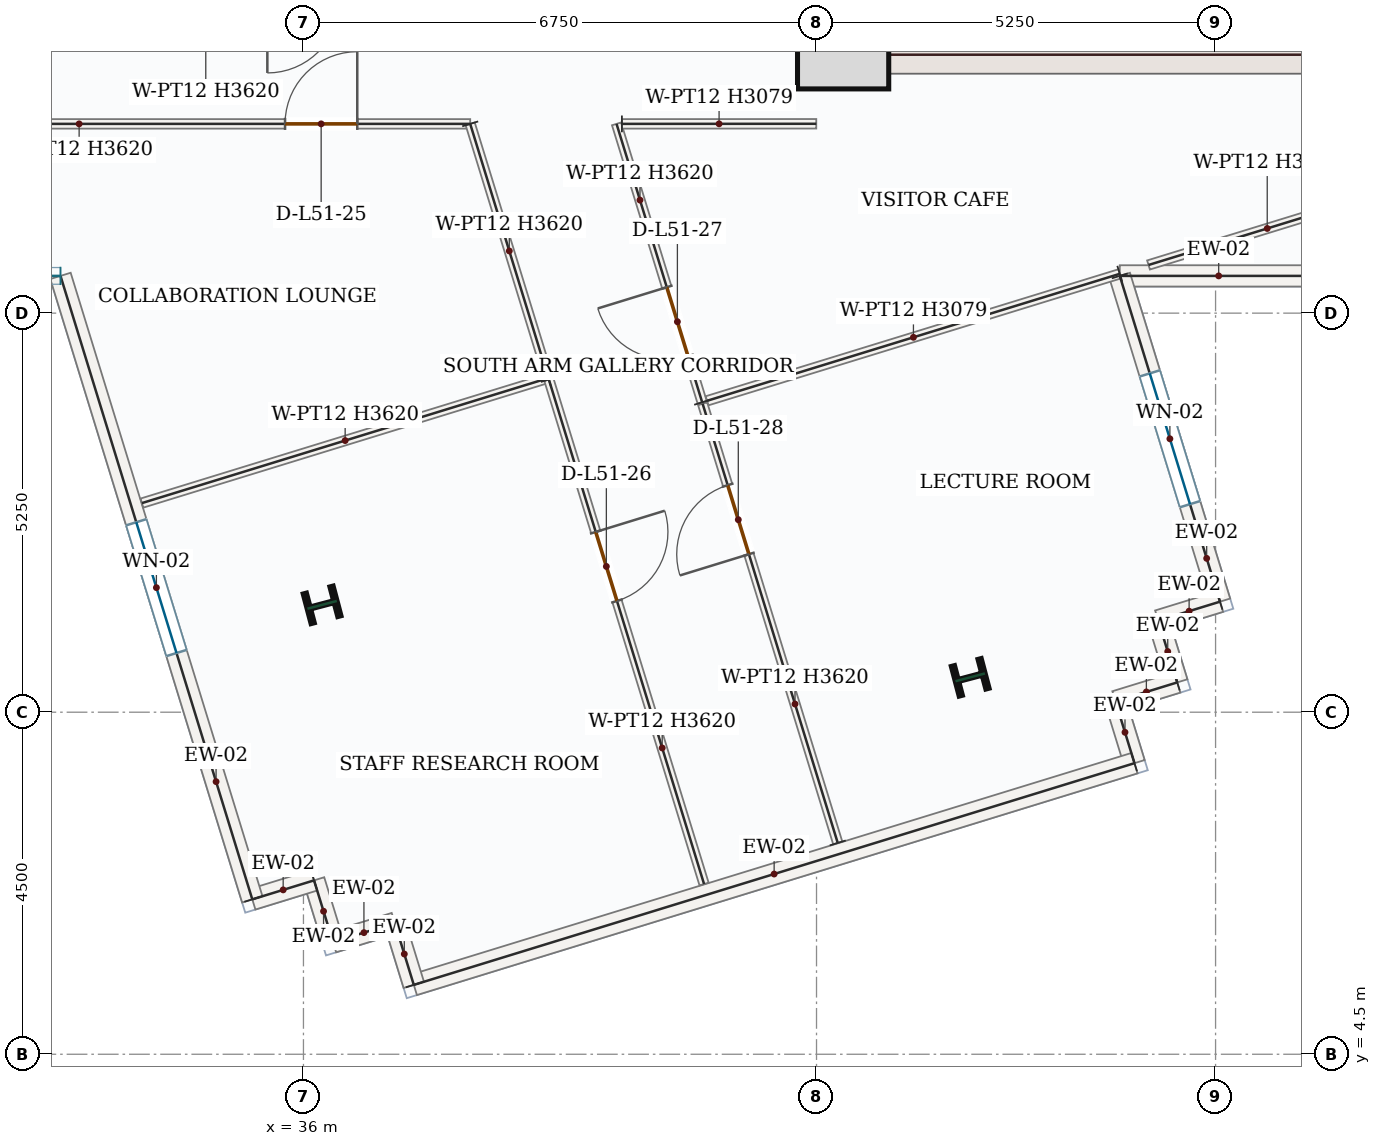
"""IFC4 building model, lengths in metres.
Left out: names, types, materials, properties, quantities, classifications, styles, units other than length and angle.
Written with IfcOpenShell. Run it as: python <this file> out.ifc"""

import sys

from ifc_helpers import new_model, si_unit, direction, frame, frame_2d, origin, origin_2d, place, context, subcontext, project, spatial, rectangle, i_section, extrude, source, transform, mapped, element, fill, save


model = new_model("IFC4")
c1 = context("Model", 3, precision=1e-05, world=origin(), true_north=direction((0.0, 1.0)))
c2 = subcontext(c1, "Body", "Model", "MODEL_VIEW")
j1 = project(units=[si_unit("LENGTHUNIT", "METRE"), si_unit("PLANEANGLEUNIT", "RADIAN")], contexts=[c1])
p1 = place(None, origin())
s1 = spatial("IfcSite", under=j1, at=p1, CompositionType="ELEMENT")
p2 = place(p1, origin())
s2 = spatial("IfcBuilding", under=s1, at=p2, CompositionType="ELEMENT")
p3 = place(p2, frame((0.0, 0.0, 217.5)))
s3 = spatial("IfcBuildingStorey", under=s2, at=p3, CompositionType="ELEMENT", Elevation=217.5)
p4 = place(p3, frame((43.0, 17.4, 0.0), z_axis=(0.0, 0.0, 1.0), x_axis=(0.0, 1.0, 0.0)))
e1 = element("IfcWall", 1, at=p4, inside=s3, PredefinedType="SHEAR", context=c2, shape_type="SweptSolid", body=[
    extrude(rectangle(XDim=8.55, YDim=0.5, at=frame_2d((4.275, 0.0))), origin(), (0.0, 0.0, 1.0), 3.62),
])
p5 = place(p4, frame((6.65, 0.0, 0.0)))
e2 = element("IfcOpeningElement", 2, at=p5, cuts=e1, PredefinedType="OPENING", context=c2, shape_type="SweptSolid", body=[
    extrude(rectangle(XDim=1.1, YDim=2.2, at=frame_2d((0.55, 1.1))), frame((0.0, 0.26, 0.0), z_axis=(0.0, -1.0, 0.0), x_axis=(1.0, 0.0, 0.0)), (0.0, 0.0, 1.0), 0.52),
])
p6 = place(p4, frame((1.75, 0.0, 0.0)))
e3 = element("IfcOpeningElement", 3, at=p6, cuts=e1, PredefinedType="OPENING", context=c2, shape_type="SweptSolid", body=[
    extrude(rectangle(XDim=1.3, YDim=2.2, at=frame_2d((0.65, 1.1))), frame((0.0, 0.26, 0.0), z_axis=(0.0, -1.0, 0.0), x_axis=(1.0, 0.0, 0.0)), (0.0, 0.0, 1.0), 0.52),
])
p7 = place(p4, frame((4.55, 0.0, 0.0)))
e4 = element("IfcOpeningElement", 4, at=p7, cuts=e1, PredefinedType="OPENING", context=c2, shape_type="SweptSolid", body=[
    extrude(rectangle(XDim=0.88, YDim=2.1, at=frame_2d((0.44, 1.05))), frame((0.0, 0.26, 0.0), z_axis=(0.0, -1.0, 0.0), x_axis=(1.0, 0.0, 0.0)), (0.0, 0.0, 1.0), 0.52),
])
m1 = source(origin(), c2, "Body", "SweptSolid", [
    extrude(rectangle(XDim=7.0, YDim=0.5, at=frame_2d((3.5, 0.0))), origin(), (0.0, 0.0, 1.0), 3.62),
])
p8 = place(p3, frame((43.25, 17.65, 0.0), z_axis=(0.0, 0.0, 1.0), x_axis=(1.0, 0.0, 0.0)))
e5 = element("IfcWall", 5, at=p8, inside=s3, PredefinedType="SHEAR", context=c2, shape_type="MappedRepresentation", body=[
    mapped(m1, transform((0.0, 0.0, 0.0), x_axis=(1.0, 0.0, 0.0), y_axis=(0.0, 1.0, 0.0), z_axis=(0.0, 0.0, 1.0), scale=1.0)),
])
m2 = source(origin(), c2, "Body", "SweptSolid", [
    extrude(rectangle(XDim=1.2, YDim=1.2, at=origin_2d()), origin(), (0.0, 0.0, 1.0), 3.9),
])
p9 = place(p3, frame((43.1, 17.8, 0.0), z_axis=(0.0, 0.0, 1.0), x_axis=(1.0, 0.0, 0.0)))
e6 = element("IfcColumn", 6, at=p9, inside=s3, PredefinedType="COLUMN", context=c2, shape_type="MappedRepresentation", body=[
    mapped(m2, transform((0.0, 0.0, 0.0), x_axis=(1.0, 0.0, 0.0), y_axis=(0.0, 1.0, 0.0), z_axis=(0.0, 0.0, 1.0), scale=1.0)),
])
m3 = source(origin(), c2, "Body", "SweptSolid", [
    extrude(i_section(OverallWidth=0.404, OverallDepth=0.407, WebThickness=0.027, FlangeThickness=0.044, FilletRadius=0.018, at=origin_2d()), origin(), (0.0, 0.0, 1.0), 3.9),
])
for number, where, z_axis, x_axis in (
    (7, (36.245, 10.412, 0.0), (0.0, 0.0, 1.0), (-0.255, 0.967, 0.0)),
    (8, (44.772, 9.459, 0.0), (0.0, 0.0, 1.0), (-0.255, 0.967, 0.0)),
):
    element("IfcColumn", number, at=place(p3, frame(where, z_axis=z_axis, x_axis=x_axis)), inside=s3, PredefinedType="COLUMN", context=c2, shape_type="MappedRepresentation", body=[
        mapped(m3, transform((0.0, 0.0, 0.0), x_axis=(1.0, 0.0, 0.0), y_axis=(0.0, 1.0, 0.0), z_axis=(0.0, 0.0, 1.0), scale=1.0)),
    ])
m4 = source(origin(), c2, "Body", "SweptSolid", [
    extrude(rectangle(XDim=2.602, YDim=0.28, at=frame_2d((1.301, 0.0))), origin(), (0.0, 0.0, 1.0), 3.62),
])
p10 = place(p3, frame((49.342, 14.74, 0.0), z_axis=(0.0, 0.0, 1.0), x_axis=(-1.0, 0.0, 0.0)))
e9 = element("IfcWall", 9, at=p10, inside=s3, PredefinedType="SOLIDWALL", context=c2, shape_type="MappedRepresentation", body=[
    mapped(m4, transform((0.0, 0.0, 0.0), x_axis=(1.0, 0.0, 0.0), y_axis=(0.0, 1.0, 0.0), z_axis=(0.0, 0.0, 1.0), scale=1.0)),
])
p11 = place(p3, frame((46.74, 14.74, 0.0), z_axis=(0.0, 0.0, 1.0), x_axis=(0.294009328951, -0.95580254995, 0.0)))
e10 = element("IfcWall", 10, at=p11, inside=s3, PredefinedType="SOLIDWALL", context=c2, shape_type="SweptSolid", body=[
    extrude(rectangle(XDim=4.484, YDim=0.28, at=frame_2d((2.242, 0.0))), origin(), (0.0, 0.0, 1.0), 3.62),
])
p12 = place(p11, frame((1.342, 0.0, 0.85)))
e11 = element("IfcOpeningElement", 11, at=p12, cuts=e10, PredefinedType="OPENING", context=c2, shape_type="SweptSolid", body=[
    extrude(rectangle(XDim=1.8, YDim=1.75, at=frame_2d((0.9, 0.875))), frame((0.0, 0.15, 0.0), z_axis=(0.0, -1.0, 0.0), x_axis=(1.0, 0.0, 0.0)), (0.0, 0.0, 1.0), 0.3),
])
m5 = source(origin(), c2, "Body", "SweptSolid", [
    extrude(rectangle(XDim=0.85, YDim=0.28, at=frame_2d((0.425, 0.0))), origin(), (0.0, 0.0, 1.0), 3.62),
])
p13 = place(p3, frame((48.058, 10.454, 0.0), z_axis=(0.0, 0.0, 1.0), x_axis=(-0.955834897765, -0.293904148005, 0.0)))
e12 = element("IfcWall", 12, at=p13, inside=s3, PredefinedType="SOLIDWALL", context=c2, shape_type="MappedRepresentation", body=[
    mapped(m5, transform((0.0, 0.0, 0.0), x_axis=(1.0, 0.0, 0.0), y_axis=(0.0, 1.0, 0.0), z_axis=(0.0, 0.0, 1.0), scale=1.0)),
])
m6 = source(origin(), c2, "Body", "SweptSolid", [
    extrude(rectangle(XDim=0.85, YDim=0.28, at=frame_2d((0.425, 0.0))), origin(), (0.0, 0.0, 1.0), 3.62),
])
p14 = place(p3, frame((47.246, 10.204, 0.0), z_axis=(0.0, 0.0, 1.0), x_axis=(0.293823460726, -0.955859704102, 0.0)))
e13 = element("IfcWall", 13, at=p14, inside=s3, PredefinedType="SOLIDWALL", context=c2, shape_type="MappedRepresentation", body=[
    mapped(m6, transform((0.0, 0.0, 0.0), x_axis=(1.0, 0.0, 0.0), y_axis=(0.0, 1.0, 0.0), z_axis=(0.0, 0.0, 1.0), scale=1.0)),
])
p15 = place(p3, frame((47.496, 9.392, 0.0), z_axis=(0.0, 0.0, 1.0), x_axis=(-0.95575416016, -0.294166594531, 0.0)))
e14 = element("IfcWall", 14, at=p15, inside=s3, PredefinedType="SOLIDWALL", context=c2, shape_type="MappedRepresentation", body=[
    mapped(m5, transform((0.0, 0.0, 0.0), x_axis=(1.0, 0.0, 0.0), y_axis=(0.0, 1.0, 0.0), z_axis=(0.0, 0.0, 1.0), scale=1.0)),
])
p16 = place(p3, frame((46.683, 9.142, 0.0), z_axis=(0.0, 0.0, 1.0), x_axis=(0.293823460726, -0.955859704102, 0.0)))
e15 = element("IfcWall", 15, at=p16, inside=s3, PredefinedType="SOLIDWALL", context=c2, shape_type="MappedRepresentation", body=[
    mapped(m6, transform((0.0, 0.0, 0.0), x_axis=(1.0, 0.0, 0.0), y_axis=(0.0, 1.0, 0.0), z_axis=(0.0, 0.0, 1.0), scale=1.0)),
])
m7 = source(origin(), c2, "Body", "SweptSolid", [
    extrude(rectangle(XDim=9.92, YDim=0.28, at=frame_2d((4.96, 0.0))), origin(), (0.0, 0.0, 1.0), 3.62),
])
p17 = place(p3, frame((46.933, 8.329, 0.0), z_axis=(0.0, 0.0, 1.0), x_axis=(-0.955796567368, -0.294028777175, 0.0)))
e16 = element("IfcWall", 16, at=p17, inside=s3, PredefinedType="SOLIDWALL", context=c2, shape_type="MappedRepresentation", body=[
    mapped(m7, transform((0.0, 0.0, 0.0), x_axis=(1.0, 0.0, 0.0), y_axis=(0.0, 1.0, 0.0), z_axis=(0.0, 0.0, 1.0), scale=1.0)),
])
for number, where, z_axis, x_axis in (
    (17, (37.452, 5.413, 0.0), (0.0, 0.0, 1.0), (-0.294, 0.956, 0.0)),
    (18, (37.202, 6.225, 0.0), (0.0, 0.0, 1.0), (-0.956, -0.294, 0.0)),
    (19, (36.389, 5.975, 0.0), (0.0, 0.0, 1.0), (-0.294, 0.956, 0.0)),
    (20, (36.139, 6.788, 0.0), (0.0, 0.0, 1.0), (-0.956, -0.294, 0.0)),
):
    element("IfcWall", number, at=place(p3, frame(where, z_axis=z_axis, x_axis=x_axis)), inside=s3, PredefinedType="SOLIDWALL", context=c2, shape_type="MappedRepresentation", body=[
        mapped(m6, transform((0.0, 0.0, 0.0), x_axis=(1.0, 0.0, 0.0), y_axis=(0.0, 1.0, 0.0), z_axis=(0.0, 0.0, 1.0), scale=1.0)),
    ])
p18 = place(p3, frame((35.327, 6.538, 0.0), z_axis=(0.0, 0.0, 1.0), x_axis=(-0.294019877333, 0.955799305154, 0.0)))
e21 = element("IfcWall", 21, at=p18, inside=s3, PredefinedType="SOLIDWALL", context=c2, shape_type="SweptSolid", body=[
    extrude(rectangle(XDim=8.582, YDim=0.28, at=frame_2d((4.291, 0.0))), origin(), (0.0, 0.0, 1.0), 3.62),
])
p19 = place(p18, frame((3.391, 0.0, 0.85)))
e22 = element("IfcOpeningElement", 22, at=p19, cuts=e21, PredefinedType="OPENING", context=c2, shape_type="SweptSolid", body=[
    extrude(rectangle(XDim=1.8, YDim=1.75, at=frame_2d((0.9, 0.875))), frame((0.0, 0.15, 0.0), z_axis=(0.0, -1.0, 0.0), x_axis=(1.0, 0.0, 0.0)), (0.0, 0.0, 1.0), 0.3),
])
p20 = place(p3, frame((41.246, 13.077, 0.0), z_axis=(0.0, 0.0, 1.0), x_axis=(-0.294050037582, 0.955790026836, 0.0)))
e23 = element("IfcWall", 23, at=p20, inside=s3, PredefinedType="PARTITIONING", context=c2, shape_type="SweptSolid", body=[
    extrude(rectangle(XDim=3.833, YDim=0.125, at=frame_2d((1.916, 0.0))), origin(), (0.0, 0.0, 1.0), 3.62),
])
p21 = place(p20, frame((0.634, 0.0, 0.0)))
e24 = element("IfcOpeningElement", 24, at=p21, cuts=e23, PredefinedType="OPENING", context=c2, shape_type="SweptSolid", body=[
    extrude(rectangle(XDim=0.95, YDim=2.15, at=frame_2d((0.475, 1.075))), frame((0.0, 0.073, 0.0), z_axis=(0.0, -1.0, 0.0), x_axis=(1.0, 0.0, 0.0)), (0.0, 0.0, 1.0), 0.145),
])
m8 = source(origin(), c2, "Body", "SweptSolid", [
    extrude(rectangle(XDim=2.557, YDim=0.125, at=frame_2d((1.278, 0.0))), origin(), (0.0, 0.0, 1.0), 3.079),
])
p22 = place(p3, frame((40.19, 16.74, 0.0), z_axis=(0.0, 0.0, 1.0), x_axis=(0.999999886036, 0.000477418068, 0.0)))
e25 = element("IfcWall", 25, at=p22, inside=s3, PredefinedType="PARTITIONING", context=c2, shape_type="MappedRepresentation", body=[
    mapped(m8, transform((0.0, 0.0, 0.0), x_axis=(1.0, 0.0, 0.0), y_axis=(0.0, 1.0, 0.0), z_axis=(0.0, 0.0, 1.0), scale=1.0)),
])
m9 = source(origin(), c2, "Body", "SweptSolid", [
    extrude(rectangle(XDim=3.268, YDim=0.125, at=frame_2d((1.634, 0.0))), origin(), (0.0, 0.0, 1.0), 3.62),
])
p23 = place(p3, frame((50.241, 15.844, 0.0), z_axis=(0.0, 0.0, 1.0), x_axis=(-0.955791929964, -0.294043851519, 0.0)))
e26 = element("IfcWall", 26, at=p23, inside=s3, PredefinedType="PARTITIONING", context=c2, shape_type="MappedRepresentation", body=[
    mapped(m9, transform((0.0, 0.0, 0.0), x_axis=(1.0, 0.0, 0.0), y_axis=(0.0, 1.0, 0.0), z_axis=(0.0, 0.0, 1.0), scale=1.0)),
])
m10 = source(origin(), c2, "Body", "SweptSolid", [
    extrude(rectangle(XDim=5.68, YDim=0.125, at=frame_2d((2.84, 0.0))), origin(), (0.0, 0.0, 1.0), 3.079),
])
p24 = place(p3, frame((46.74, 14.767, 0.0), z_axis=(0.0, 0.0, 1.0), x_axis=(-0.955800379324, -0.294016385402, 0.0)))
e27 = element("IfcWall", 27, at=p24, inside=s3, PredefinedType="PARTITIONING", context=c2, shape_type="MappedRepresentation", body=[
    mapped(m10, transform((0.0, 0.0, 0.0), x_axis=(1.0, 0.0, 0.0), y_axis=(0.0, 1.0, 0.0), z_axis=(0.0, 0.0, 1.0), scale=1.0)),
])
p25 = place(p3, frame((30.49, 16.74, 0.0), z_axis=(0.0, 0.0, 1.0), x_axis=(1.0, 0.0, 0.0)))
e28 = element("IfcWall", 28, at=p25, inside=s3, PredefinedType="PARTITIONING", context=c2, shape_type="SweptSolid", body=[
    extrude(rectangle(XDim=7.704, YDim=0.125, at=frame_2d((3.852, 0.0))), origin(), (0.0, 0.0, 1.0), 3.62),
])
p26 = place(p25, frame((5.268, 0.0, 0.0)))
e29 = element("IfcOpeningElement", 29, at=p26, cuts=e28, PredefinedType="OPENING", context=c2, shape_type="SweptSolid", body=[
    extrude(rectangle(XDim=0.95, YDim=2.15, at=frame_2d((0.475, 1.075))), frame((0.0, 0.073, 0.0), z_axis=(0.0, -1.0, 0.0), x_axis=(1.0, 0.0, 0.0)), (0.0, 0.0, 1.0), 0.145),
])
m11 = source(origin(), c2, "Body", "SweptSolid", [
    extrude(rectangle(XDim=3.498, YDim=0.125, at=frame_2d((1.749, 0.0))), origin(), (0.0, 0.0, 1.0), 3.62),
])
p27 = place(p3, frame((38.194, 16.74, 0.0), z_axis=(0.0, 0.0, 1.0), x_axis=(0.294012288782, -0.955801639487, 0.0)))
e30 = element("IfcWall", 30, at=p27, inside=s3, PredefinedType="PARTITIONING", context=c2, shape_type="MappedRepresentation", body=[
    mapped(m11, transform((0.0, 0.0, 0.0), x_axis=(1.0, 0.0, 0.0), y_axis=(0.0, 1.0, 0.0), z_axis=(0.0, 0.0, 1.0), scale=1.0)),
])
m12 = source(origin(), c2, "Body", "SweptSolid", [
    extrude(rectangle(XDim=5.595, YDim=0.125, at=frame_2d((2.797, 0.0))), origin(), (0.0, 0.0, 1.0), 3.62),
])
p28 = place(p3, frame((39.222, 13.396, 0.0), z_axis=(0.0, 0.0, 1.0), x_axis=(-0.955787499516, -0.294058252339, 0.0)))
e31 = element("IfcWall", 31, at=p28, inside=s3, PredefinedType="PARTITIONING", context=c2, shape_type="MappedRepresentation", body=[
    mapped(m12, transform((0.0, 0.0, 0.0), x_axis=(1.0, 0.0, 0.0), y_axis=(0.0, 1.0, 0.0), z_axis=(0.0, 0.0, 1.0), scale=1.0)),
])
p29 = place(p3, frame((43.029, 7.28, 0.0), z_axis=(0.0, 0.0, 1.0), x_axis=(-0.294054630952, 0.955788613667, 0.0)))
e32 = element("IfcWall", 32, at=p29, inside=s3, PredefinedType="PARTITIONING", context=c2, shape_type="SweptSolid", body=[
    extrude(rectangle(XDim=6.045, YDim=0.125, at=frame_2d((3.022, 0.0))), origin(), (0.0, 0.0, 1.0), 3.62),
])
p30 = place(p29, frame((3.974, 0.0, 0.0)))
e33 = element("IfcOpeningElement", 33, at=p30, cuts=e32, PredefinedType="OPENING", context=c2, shape_type="SweptSolid", body=[
    extrude(rectangle(XDim=0.95, YDim=2.15, at=frame_2d((0.475, 1.075))), frame((0.0, 0.073, 0.0), z_axis=(0.0, -1.0, 0.0), x_axis=(1.0, 0.0, 0.0)), (0.0, 0.0, 1.0), 0.145),
])
p31 = place(p3, frame((39.229, 13.377, 0.0), z_axis=(0.0, 0.0, 1.0), x_axis=(0.294016682873, -0.955800287818, 0.0)))
e34 = element("IfcWall", 34, at=p31, inside=s3, PredefinedType="PARTITIONING", context=c2, shape_type="SweptSolid", body=[
    extrude(rectangle(XDim=6.945, YDim=0.125, at=frame_2d((3.473, 0.0))), origin(), (0.0, 0.0, 1.0), 3.62),
])
p32 = place(p31, frame((2.098, 0.0, 0.0)))
e35 = element("IfcOpeningElement", 35, at=p32, cuts=e34, PredefinedType="OPENING", context=c2, shape_type="SweptSolid", body=[
    extrude(rectangle(XDim=0.95, YDim=2.15, at=frame_2d((0.475, 1.075))), frame((0.0, 0.073, 0.0), z_axis=(0.0, -1.0, 0.0), x_axis=(1.0, 0.0, 0.0)), (0.0, 0.0, 1.0), 0.145),
])
m13 = source(origin(), c2, "Body", "SweptSolid", [
    extrude(rectangle(XDim=1.8, YDim=1.75, at=frame_2d((0.9, 0.875))), frame((0.0, 0.03, 0.0), z_axis=(0.0, -1.0, 0.0), x_axis=(1.0, 0.0, 0.0)), (0.0, 0.0, 1.0), 0.06),
])
p33 = place(p12, origin())
e36 = element("IfcWindow", 36, at=p33, inside=s3, PartitioningType="DOUBLE_PANEL_VERTICAL", PredefinedType="WINDOW", context=c2, shape_type="MappedRepresentation", body=[
    mapped(m13, transform((0.0, 0.0, 0.0), x_axis=(1.0, 0.0, 0.0), y_axis=(0.0, 1.0, 0.0), z_axis=(0.0, 0.0, 1.0), scale=1.0)),
])
fill(e11, e36)
p34 = place(p19, origin())
e37 = element("IfcWindow", 37, at=p34, inside=s3, PartitioningType="DOUBLE_PANEL_VERTICAL", PredefinedType="WINDOW", context=c2, shape_type="MappedRepresentation", body=[
    mapped(m13, transform((0.0, 0.0, 0.0), x_axis=(1.0, 0.0, 0.0), y_axis=(0.0, 1.0, 0.0), z_axis=(0.0, 0.0, 1.0), scale=1.0)),
])
fill(e22, e37)
m14 = source(origin(), c2, "Body", "SweptSolid", [
    extrude(rectangle(XDim=0.95, YDim=2.15, at=frame_2d((0.475, 1.075))), frame((0.0, 0.025, 0.0), z_axis=(0.0, -1.0, 0.0), x_axis=(1.0, 0.0, 0.0)), (0.0, 0.0, 1.0), 0.05),
])
p35 = place(p26, origin())
e38 = element("IfcDoor", 38, at=p35, inside=s3, OperationType="SINGLE_SWING_RIGHT", PredefinedType="DOOR", context=c2, shape_type="MappedRepresentation", body=[
    mapped(m14, transform((0.0, 0.0, 0.0), x_axis=(1.0, 0.0, 0.0), y_axis=(0.0, 1.0, 0.0), z_axis=(0.0, 0.0, 1.0), scale=1.0)),
])
fill(e29, e38)
p36 = place(p32, origin())
e39 = element("IfcDoor", 39, at=p36, inside=s3, OperationType="SINGLE_SWING_LEFT", PredefinedType="DOOR", context=c2, shape_type="MappedRepresentation", body=[
    mapped(m14, transform((0.0, 0.0, 0.0), x_axis=(1.0, 0.0, 0.0), y_axis=(0.0, 1.0, 0.0), z_axis=(0.0, 0.0, 1.0), scale=1.0)),
])
fill(e35, e39)
p37 = place(p21, origin())
e40 = element("IfcDoor", 40, at=p37, inside=s3, OperationType="SINGLE_SWING_RIGHT", PredefinedType="DOOR", context=c2, shape_type="MappedRepresentation", body=[
    mapped(m14, transform((0.0, 0.0, 0.0), x_axis=(1.0, 0.0, 0.0), y_axis=(0.0, 1.0, 0.0), z_axis=(0.0, 0.0, 1.0), scale=1.0)),
])
fill(e24, e40)
p38 = place(p30, origin())
e41 = element("IfcDoor", 41, at=p38, inside=s3, OperationType="SINGLE_SWING_LEFT", PredefinedType="DOOR", context=c2, shape_type="MappedRepresentation", body=[
    mapped(m14, transform((0.0, 0.0, 0.0), x_axis=(1.0, 0.0, 0.0), y_axis=(0.0, 1.0, 0.0), z_axis=(0.0, 0.0, 1.0), scale=1.0)),
])
fill(e33, e41)
save(model, sys.argv[1])
